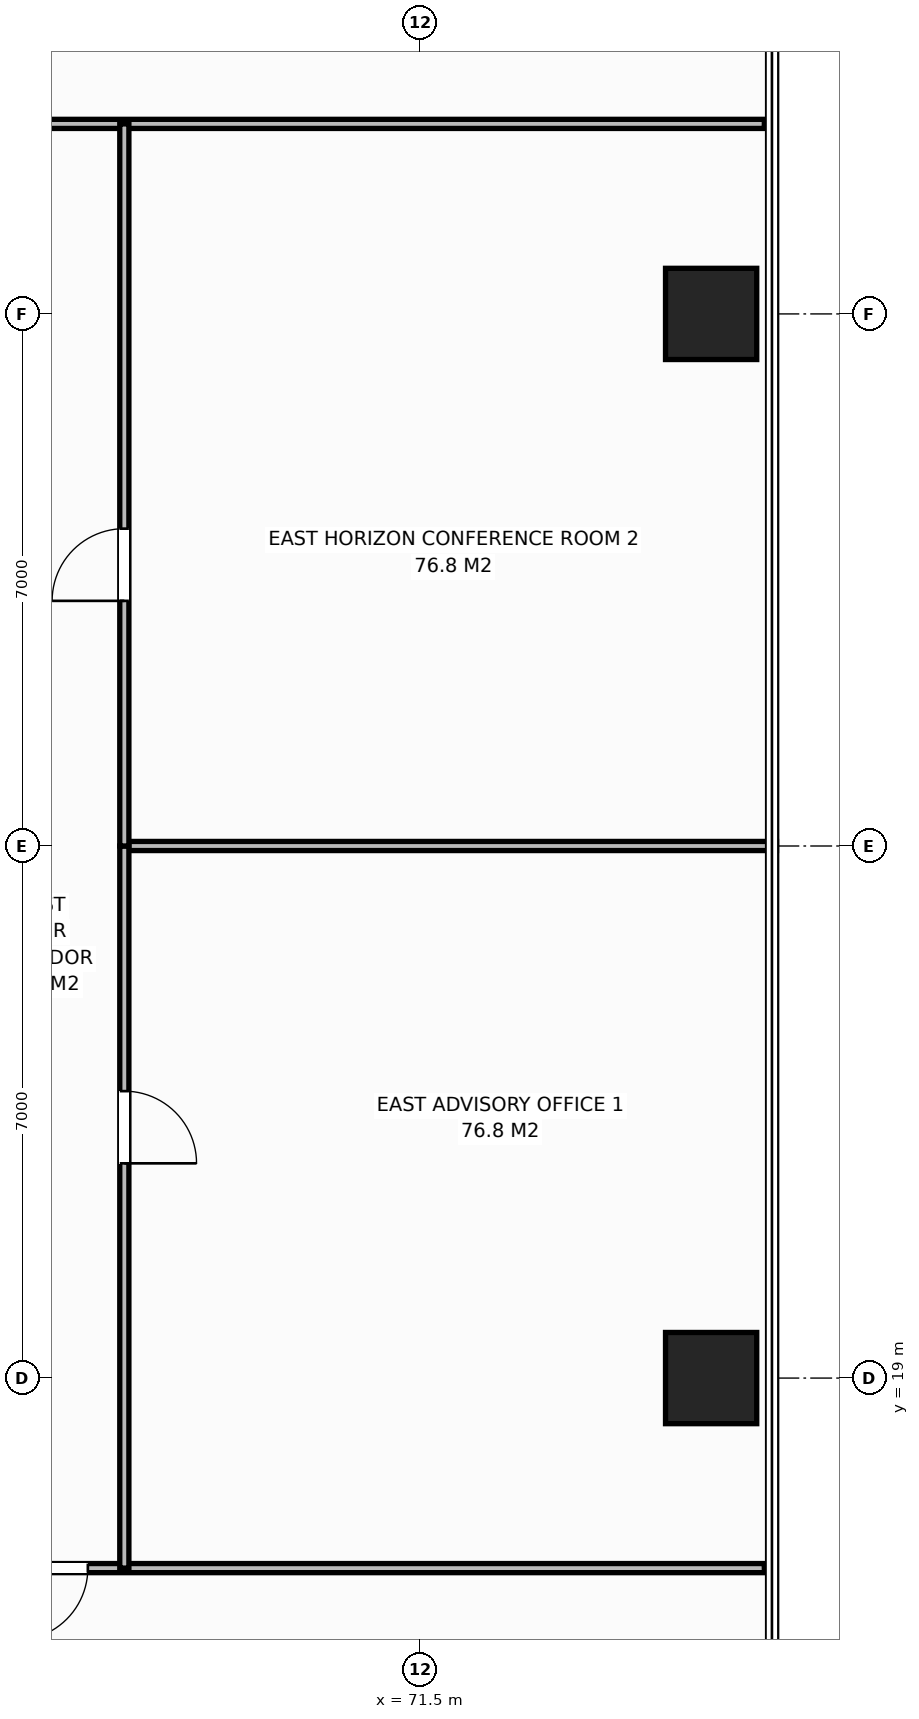
"""IFC4 building model, lengths in metres.
Left out: names, types, materials, properties, quantities, classifications, styles, units other than length and angle.
Written with IfcOpenShell. Run it as: python <this file> out.ifc"""

import sys

from ifc_helpers import new_model, si_unit, direction, frame, frame_2d, origin, origin_2d, place, context, subcontext, project, spatial, rectangle, extrude, element, fill, save


model = new_model("IFC4")
c1 = context("Model", 3, precision=1e-05, world=origin(), true_north=direction((0.0, 1.0)))
c2 = subcontext(c1, "Body", "Model", "MODEL_VIEW")
j1 = project(units=[si_unit("LENGTHUNIT", "METRE"), si_unit("PLANEANGLEUNIT", "RADIAN")], contexts=[c1])
p1 = place(None, origin())
s1 = spatial("IfcSite", under=j1, at=p1, CompositionType="ELEMENT")
p2 = place(p1, origin())
s2 = spatial("IfcBuilding", under=s1, at=p2, CompositionType="ELEMENT")
p3 = place(p2, frame((0.0, 0.0, 101.2)))
s3 = spatial("IfcBuildingStorey", under=s2, at=p3, CompositionType="ELEMENT", Elevation=101.2)
for number, where, z_axis, x_axis in (
    (1, (75.32, 19.0, 0.0), (0.0, 0.0, 1.0), (1.0, 0.0, 0.0)),
    (2, (75.32, 33.0, 0.0), (0.0, 0.0, 1.0), (1.0, 0.0, 0.0)),
):
    element("IfcColumn", number, at=place(p3, frame(where, z_axis=z_axis, x_axis=x_axis)), inside=s3, PredefinedType="COLUMN", context=c2, shape_type="SweptSolid", body=[
        extrude(rectangle(XDim=1.2, YDim=1.2, at=origin_2d()), origin(), (0.0, 0.0, 1.0), 3.8),
    ])
p4 = place(p3, frame((57.637, 35.5, 0.0), z_axis=(0.0, 0.0, 1.0), x_axis=(1.0, 0.0, 0.0)))
e3 = element("IfcWall", 3, at=p4, inside=s3, PredefinedType="PARTITIONING", context=c2, shape_type="SweptSolid", body=[
    extrude(rectangle(XDim=18.383, YDim=0.12, at=frame_2d((9.192, 0.0))), origin(), (0.0, 0.0, 1.0), 3.565),
])
p5 = place(p4, frame((4.507, 0.0, 0.0)))
e4 = element("IfcOpeningElement", 4, at=p5, cuts=e3, PredefinedType="OPENING", context=c2, shape_type="SweptSolid", body=[
    extrude(rectangle(XDim=0.95, YDim=2.15, at=frame_2d((0.475, 1.075))), frame((0.0, 0.07, 0.0), z_axis=(0.0, -1.0, 0.0), x_axis=(1.0, 0.0, 0.0)), (0.0, 0.0, 1.0), 0.14),
])
p6 = place(p3, frame((64.86, 16.5, 0.0), z_axis=(0.0, 0.0, 1.0), x_axis=(1.0, 0.0, 0.0)))
e5 = element("IfcWall", 5, at=p6, inside=s3, PredefinedType="PARTITIONING", context=c2, shape_type="SweptSolid", body=[
    extrude(rectangle(XDim=11.16, YDim=0.12, at=frame_2d((5.58, 0.0))), origin(), (0.0, 0.0, 1.0), 3.565),
])
p7 = place(p6, frame((1.31, 0.0, 0.0)))
e6 = element("IfcOpeningElement", 6, at=p7, cuts=e5, PredefinedType="OPENING", context=c2, shape_type="SweptSolid", body=[
    extrude(rectangle(XDim=0.95, YDim=2.15, at=frame_2d((0.475, 1.075))), frame((0.0, 0.07, 0.0), z_axis=(0.0, -1.0, 0.0), x_axis=(1.0, 0.0, 0.0)), (0.0, 0.0, 1.0), 0.14),
])
p8 = place(p3, frame((67.6, 26.0, 0.0), z_axis=(0.0, 0.0, 1.0), x_axis=(1.0, 0.0, 0.0)))
e7 = element("IfcWall", 7, at=p8, inside=s3, PredefinedType="PARTITIONING", context=c2, shape_type="SweptSolid", body=[
    extrude(rectangle(XDim=8.58, YDim=0.12, at=frame_2d((4.29, 0.0))), origin(), (0.0, 0.0, 1.0), 3.565),
])
p9 = place(p3, frame((67.6, 16.5, 0.0), z_axis=(0.0, 0.0, 1.0), x_axis=(0.0, 1.0, 0.0)))
e8 = element("IfcWall", 8, at=p9, inside=s3, PredefinedType="PARTITIONING", context=c2, shape_type="SweptSolid", body=[
    extrude(rectangle(XDim=9.5, YDim=0.12, at=frame_2d((4.75, 0.0))), origin(), (0.0, 0.0, 1.0), 3.565),
])
p10 = place(p9, frame((5.325, 0.0, 0.0)))
e9 = element("IfcOpeningElement", 9, at=p10, cuts=e8, PredefinedType="OPENING", context=c2, shape_type="SweptSolid", body=[
    extrude(rectangle(XDim=0.95, YDim=2.15, at=frame_2d((0.475, 1.075))), frame((0.0, 0.07, 0.0), z_axis=(0.0, -1.0, 0.0), x_axis=(1.0, 0.0, 0.0)), (0.0, 0.0, 1.0), 0.14),
])
p11 = place(p3, frame((67.6, 26.0, 0.0), z_axis=(0.0, 0.0, 1.0), x_axis=(0.0, 1.0, 0.0)))
e10 = element("IfcWall", 10, at=p11, inside=s3, PredefinedType="PARTITIONING", context=c2, shape_type="SweptSolid", body=[
    extrude(rectangle(XDim=9.5, YDim=0.12, at=frame_2d((4.75, 0.0))), origin(), (0.0, 0.0, 1.0), 3.565),
])
p12 = place(p11, frame((3.225, 0.0, 0.0)))
e11 = element("IfcOpeningElement", 11, at=p12, cuts=e10, PredefinedType="OPENING", context=c2, shape_type="SweptSolid", body=[
    extrude(rectangle(XDim=0.95, YDim=2.15, at=frame_2d((0.475, 1.075))), frame((0.0, 0.07, 0.0), z_axis=(0.0, -1.0, 0.0), x_axis=(1.0, 0.0, 0.0)), (0.0, 0.0, 1.0), 0.14),
])
p13 = place(p7, origin())
e12 = element("IfcDoor", 12, at=p13, inside=s3, OperationType="SINGLE_SWING_RIGHT", PredefinedType="DOOR", context=c2, shape_type="SweptSolid", body=[
    extrude(rectangle(XDim=0.95, YDim=2.15, at=frame_2d((0.475, 1.075))), frame((0.0, 0.025, 0.0), z_axis=(0.0, -1.0, 0.0), x_axis=(1.0, 0.0, 0.0)), (0.0, 0.0, 1.0), 0.05),
])
fill(e6, e12)
p14 = place(p10, origin())
e13 = element("IfcDoor", 13, at=p14, inside=s3, OperationType="SINGLE_SWING_RIGHT", PredefinedType="DOOR", context=c2, shape_type="SweptSolid", body=[
    extrude(rectangle(XDim=0.95, YDim=2.15, at=frame_2d((0.475, 1.075))), frame((0.0, 0.025, 0.0), z_axis=(0.0, -1.0, 0.0), x_axis=(1.0, 0.0, 0.0)), (0.0, 0.0, 1.0), 0.05),
])
fill(e9, e13)
p15 = place(p12, origin())
e14 = element("IfcDoor", 14, at=p15, inside=s3, OperationType="SINGLE_SWING_LEFT", PredefinedType="DOOR", context=c2, shape_type="SweptSolid", body=[
    extrude(rectangle(XDim=0.95, YDim=2.15, at=frame_2d((0.475, 1.075))), frame((0.0, 0.025, 0.0), z_axis=(0.0, -1.0, 0.0), x_axis=(1.0, 0.0, 0.0)), (0.0, 0.0, 1.0), 0.05),
])
fill(e11, e14)
save(model, sys.argv[1])
